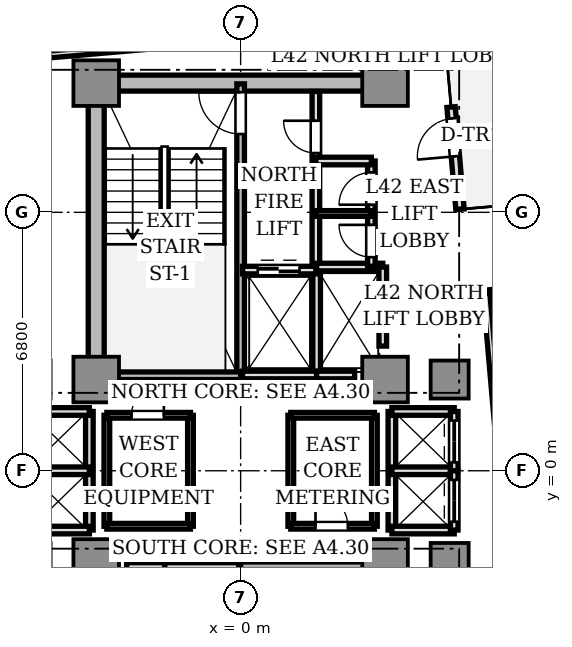
"""IFC4 building model, lengths in metres.
Left out: names, types, materials, properties, quantities, classifications, styles, units other than length and angle.
Written with IfcOpenShell. Run it as: python <this file> out.ifc"""

import sys

from ifc_helpers import new_model, si_unit, direction, frame, frame_2d, origin, origin_2d, place, context, subcontext, project, spatial, rectangle, extrude, source, transform, mapped, element, fill, save


model = new_model("IFC4")
c1 = context("Model", 3, precision=1e-05, world=origin(), true_north=direction((0.0, 1.0)))
c2 = subcontext(c1, "Body", "Model", "MODEL_VIEW")
j1 = project(units=[si_unit("LENGTHUNIT", "METRE"), si_unit("PLANEANGLEUNIT", "RADIAN")], contexts=[c1])
p1 = place(None, origin())
s1 = spatial("IfcSite", under=j1, at=p1, CompositionType="ELEMENT")
p2 = place(p1, origin())
s2 = spatial("IfcBuilding", under=s1, at=p2, CompositionType="ELEMENT")
p3 = place(p2, frame((0.0, 0.0, 153.95)))
s3 = spatial("IfcBuildingStorey", under=s2, at=p3, CompositionType="ELEMENT", Elevation=153.95)
p4 = place(p3, frame((-3.55, 10.2, 0.0), z_axis=(0.0, 0.0, 1.0), x_axis=(1.0, 0.0, 0.0)))
e1 = element("IfcWall", 1, at=p4, inside=s3, PredefinedType="SHEAR", context=c2, shape_type="SweptSolid", body=[
    extrude(rectangle(XDim=7.1, YDim=0.42, at=frame_2d((3.55, 0.0))), origin(), (0.0, 0.0, 1.0), 3.11),
])
p5 = place(p3, frame((-3.8, 2.85, 0.0), z_axis=(0.0, 0.0, 1.0), x_axis=(0.0, 1.0, 0.0)))
e2 = element("IfcWall", 2, at=p5, inside=s3, PredefinedType="SHEAR", context=c2, shape_type="SweptSolid", body=[
    extrude(rectangle(XDim=6.9, YDim=0.42, at=frame_2d((3.45, 0.0))), origin(), (0.0, 0.0, 1.0), 3.11),
])
m1 = source(origin(), c2, "Body", "SweptSolid", [
    extrude(rectangle(XDim=1.2, YDim=1.2, at=origin_2d()), origin(), (0.0, 0.0, 1.0), 3.11),
])
for number, where, z_axis, x_axis in (
    (3, (-3.8, 2.4, 0.0), (0.0, 0.0, 1.0), (1.0, 0.0, 0.0)),
    (4, (3.8, 2.4, 0.0), (0.0, 0.0, 1.0), (1.0, 0.0, 0.0)),
    (5, (-3.8, 10.2, 0.0), (0.0, 0.0, 1.0), (1.0, 0.0, 0.0)),
    (6, (3.8, 10.2, 0.0), (0.0, 0.0, 1.0), (1.0, 0.0, 0.0)),
    (7, (-3.8, -2.4, 0.0), (0.0, 0.0, 1.0), (1.0, 0.0, 0.0)),
    (8, (3.8, -2.4, 0.0), (0.0, 0.0, 1.0), (1.0, 0.0, 0.0)),
):
    element("IfcColumn", number, at=place(p3, frame(where, z_axis=z_axis, x_axis=x_axis)), inside=s3, PredefinedType="COLUMN", context=c2, shape_type="MappedRepresentation", body=[
        mapped(m1, transform((0.0, 0.0, 0.0), scale=1.0)),
    ])
m2 = source(origin(), c2, "Body", "SweptSolid", [
    extrude(rectangle(XDim=1.0, YDim=1.0, at=origin_2d()), origin(), (0.0, 0.0, 1.0), 3.11),
])
for number, where, z_axis, x_axis in (
    (9, (5.5, 2.4, 0.0), (0.0, 0.0, 1.0), (1.0, 0.0, 0.0)),
    (10, (5.5, -2.4, 0.0), (0.0, 0.0, 1.0), (1.0, 0.0, 0.0)),
):
    element("IfcColumn", number, at=place(p3, frame(where, z_axis=z_axis, x_axis=x_axis)), inside=s3, PredefinedType="COLUMN", context=c2, shape_type="MappedRepresentation", body=[
        mapped(m2, transform((0.0, 0.0, 0.0), scale=1.0)),
    ])
p6 = place(p3, frame((5.772, 6.879, 0.0), z_axis=(0.0, 0.0, 1.0), x_axis=(-0.087168071984, 0.996193619346, 0.0)))
e11 = element("IfcWall", 11, at=p6, inside=s3, PredefinedType="STANDARD", context=c2, shape_type="SweptSolid", body=[
    extrude(rectangle(XDim=2.7, YDim=0.22, at=frame_2d((1.35, 0.0))), origin(), (0.0, 0.0, 1.0), 3.11),
])
p7 = place(p6, frame((1.4, 0.0, 0.0)))
e12 = element("IfcOpeningElement", 12, at=p7, cuts=e11, PredefinedType="OPENING", context=c2, shape_type="SweptSolid", body=[
    extrude(rectangle(XDim=1.0, YDim=2.2, at=frame_2d((0.5, 1.1))), frame((0.0, 0.12, 0.0), z_axis=(0.0, -1.0, 0.0), x_axis=(1.0, 0.0, 0.0)), (0.0, 0.0, 1.0), 0.24),
])
p8 = place(p3, frame((0.0, 2.5, 0.0), z_axis=(0.0, 0.0, 1.0), x_axis=(0.0, 1.0, 0.0)))
e13 = element("IfcWall", 13, at=p8, inside=s3, PredefinedType="SOLIDWALL", context=c2, shape_type="SweptSolid", body=[
    extrude(rectangle(XDim=7.68, YDim=0.2, at=frame_2d((3.84, 0.0))), origin(), (0.0, 0.0, 1.0), 3.11),
])
p9 = place(p8, frame((6.36, 0.0, 0.0)))
e14 = element("IfcOpeningElement", 14, at=p9, cuts=e13, PredefinedType="OPENING", context=c2, shape_type="SweptSolid", body=[
    extrude(rectangle(XDim=1.1, YDim=2.15, at=frame_2d((0.55, 1.075))), frame((0.0, 0.11, 0.0), z_axis=(0.0, -1.0, 0.0), x_axis=(1.0, 0.0, 0.0)), (0.0, 0.0, 1.0), 0.22),
])
p10 = place(p3, frame((-3.72, 2.5, 0.0), z_axis=(0.0, 0.0, 1.0), x_axis=(1.0, 0.0, 0.0)))
e15 = element("IfcWall", 15, at=p10, inside=s3, PredefinedType="SOLIDWALL", context=c2, shape_type="SweptSolid", body=[
    extrude(rectangle(XDim=3.72, YDim=0.2, at=frame_2d((1.86, 0.0))), origin(), (0.0, 0.0, 1.0), 3.11),
])
p11 = place(p3, frame((0.0, -10.18, 0.0), z_axis=(0.0, 0.0, 1.0), x_axis=(0.0, 1.0, 0.0)))
e16 = element("IfcWall", 16, at=p11, inside=s3, PredefinedType="SOLIDWALL", context=c2, shape_type="SweptSolid", body=[
    extrude(rectangle(XDim=7.68, YDim=0.2, at=frame_2d((3.84, 0.0))), origin(), (0.0, 0.0, 1.0), 3.11),
])
p12 = place(p11, frame((0.28, 0.0, 0.0)))
e17 = element("IfcOpeningElement", 17, at=p12, cuts=e16, PredefinedType="OPENING", context=c2, shape_type="SweptSolid", body=[
    extrude(rectangle(XDim=1.1, YDim=2.15, at=frame_2d((0.55, 1.075))), frame((0.0, 0.11, 0.0), z_axis=(0.0, -1.0, 0.0), x_axis=(1.0, 0.0, 0.0)), (0.0, 0.0, 1.0), 0.22),
])
p13 = place(p3, frame((0.0, -2.5, 0.0), z_axis=(0.0, 0.0, 1.0), x_axis=(1.0, 0.0, 0.0)))
e18 = element("IfcWall", 18, at=p13, inside=s3, PredefinedType="SOLIDWALL", context=c2, shape_type="SweptSolid", body=[
    extrude(rectangle(XDim=3.72, YDim=0.2, at=frame_2d((1.86, 0.0))), origin(), (0.0, 0.0, 1.0), 3.11),
])
p14 = place(p3, frame((1.98, 5.32, 0.0), z_axis=(0.0, 0.0, 1.0), x_axis=(0.0, 1.0, 0.0)))
e19 = element("IfcWall", 19, at=p14, inside=s3, PredefinedType="SOLIDWALL", context=c2, shape_type="SweptSolid", body=[
    extrude(rectangle(XDim=4.66, YDim=0.2, at=frame_2d((2.33, 0.0))), origin(), (0.0, 0.0, 1.0), 2.66),
])
p15 = place(p14, frame((3.04, 0.0, 0.0)))
e20 = element("IfcOpeningElement", 20, at=p15, cuts=e19, PredefinedType="OPENING", context=c2, shape_type="SweptSolid", body=[
    extrude(rectangle(XDim=0.85, YDim=2.1, at=frame_2d((0.425, 1.05))), frame((0.0, 0.11, 0.0), z_axis=(0.0, -1.0, 0.0), x_axis=(1.0, 0.0, 0.0)), (0.0, 0.0, 1.0), 0.22),
])
p16 = place(p3, frame((2.0, 2.5, 0.0), z_axis=(0.0, 0.0, 1.0), x_axis=(0.0, 1.0, 0.0)))
e21 = element("IfcWall", 21, at=p16, inside=s3, PredefinedType="SOLIDWALL", context=c2, shape_type="SweptSolid", body=[
    extrude(rectangle(XDim=2.78, YDim=0.2, at=frame_2d((1.39, 0.0))), origin(), (0.0, 0.0, 1.0), 2.66),
])
p17 = place(p3, frame((0.05, 2.52, 0.0), z_axis=(0.0, 0.0, 1.0), x_axis=(1.0, 0.0, 0.0)))
e22 = element("IfcWall", 22, at=p17, inside=s3, PredefinedType="SOLIDWALL", context=c2, shape_type="SweptSolid", body=[
    extrude(rectangle(XDim=1.95, YDim=0.2, at=frame_2d((0.975, 0.0))), origin(), (0.0, 0.0, 1.0), 2.66),
])
p18 = place(p3, frame((0.05, 5.28, 0.0), z_axis=(0.0, 0.0, 1.0), x_axis=(1.0, 0.0, 0.0)))
e23 = element("IfcWall", 23, at=p18, inside=s3, PredefinedType="SOLIDWALL", context=c2, shape_type="SweptSolid", body=[
    extrude(rectangle(XDim=1.93, YDim=0.2, at=frame_2d((0.965, 0.0))), origin(), (0.0, 0.0, 1.0), 2.66),
])
p19 = place(p18, frame((0.4, 0.0, 0.0)))
e24 = element("IfcOpeningElement", 24, at=p19, cuts=e23, PredefinedType="OPENING", context=c2, shape_type="SweptSolid", body=[
    extrude(rectangle(XDim=1.1, YDim=2.2, at=frame_2d((0.55, 1.1))), frame((0.0, 0.11, 0.0), z_axis=(0.0, -1.0, 0.0), x_axis=(1.0, 0.0, 0.0)), (0.0, 0.0, 1.0), 0.22),
])
p20 = place(p3, frame((-2.0, -5.28, 0.0), z_axis=(0.0, 0.0, 1.0), x_axis=(0.0, 1.0, 0.0)))
e25 = element("IfcWall", 25, at=p20, inside=s3, PredefinedType="SOLIDWALL", context=c2, shape_type="SweptSolid", body=[
    extrude(rectangle(XDim=2.78, YDim=0.2, at=frame_2d((1.39, 0.0))), origin(), (0.0, 0.0, 1.0), 2.66),
])
p21 = place(p3, frame((-2.0, -2.52, 0.0), z_axis=(0.0, 0.0, 1.0), x_axis=(1.0, 0.0, 0.0)))
e26 = element("IfcWall", 26, at=p21, inside=s3, PredefinedType="SOLIDWALL", context=c2, shape_type="SweptSolid", body=[
    extrude(rectangle(XDim=1.95, YDim=0.2, at=frame_2d((0.975, 0.0))), origin(), (0.0, 0.0, 1.0), 2.66),
])
p22 = place(p3, frame((2.0, 2.52, 0.0), z_axis=(0.0, 0.0, 1.0), x_axis=(1.0, 0.0, 0.0)))
e27 = element("IfcWall", 27, at=p22, inside=s3, PredefinedType="SOLIDWALL", context=c2, shape_type="SweptSolid", body=[
    extrude(rectangle(XDim=1.0, YDim=0.2, at=frame_2d((0.5, 0.0))), origin(), (0.0, 0.0, 1.0), 2.66),
])
p23 = place(p3, frame((2.0, 5.36, 0.0), z_axis=(0.0, 0.0, 1.0), x_axis=(1.0, 0.0, 0.0)))
e28 = element("IfcWall", 28, at=p23, inside=s3, PredefinedType="SOLIDWALL", context=c2, shape_type="SweptSolid", body=[
    extrude(rectangle(XDim=1.74, YDim=0.2, at=frame_2d((0.87, 0.0))), origin(), (0.0, 0.0, 1.0), 2.66),
])
p24 = place(p3, frame((3.74, 3.28, 0.0), z_axis=(0.0, 0.0, 1.0), x_axis=(0.0, 1.0, 0.0)))
e29 = element("IfcWall", 29, at=p24, inside=s3, PredefinedType="SOLIDWALL", context=c2, shape_type="SweptSolid", body=[
    extrude(rectangle(XDim=2.08, YDim=0.2, at=frame_2d((1.04, 0.0))), origin(), (0.0, 0.0, 1.0), 2.66),
])
p25 = place(p24, frame((0.44, 0.0, 0.0)))
e30 = element("IfcOpeningElement", 30, at=p25, cuts=e29, PredefinedType="OPENING", context=c2, shape_type="SweptSolid", body=[
    extrude(rectangle(XDim=1.2, YDim=2.2, at=frame_2d((0.6, 1.1))), frame((0.0, 0.11, 0.0), z_axis=(0.0, -1.0, 0.0), x_axis=(1.0, 0.0, 0.0)), (0.0, 0.0, 1.0), 0.22),
])
p26 = place(p3, frame((-3.0, -2.52, 0.0), z_axis=(0.0, 0.0, 1.0), x_axis=(1.0, 0.0, 0.0)))
e31 = element("IfcWall", 31, at=p26, inside=s3, PredefinedType="SOLIDWALL", context=c2, shape_type="SweptSolid", body=[
    extrude(rectangle(XDim=1.0, YDim=0.2, at=frame_2d((0.5, 0.0))), origin(), (0.0, 0.0, 1.0), 2.66),
])
p27 = place(p3, frame((3.98, -1.56, 0.0), z_axis=(0.0, 0.0, 1.0), x_axis=(0.0, 1.0, 0.0)))
e32 = element("IfcWall", 32, at=p27, inside=s3, PredefinedType="SOLIDWALL", context=c2, shape_type="SweptSolid", body=[
    extrude(rectangle(XDim=3.12, YDim=0.2, at=frame_2d((1.56, 0.0))), origin(), (0.0, 0.0, 1.0), 2.28),
])
for number, where, z_axis, x_axis in (
    (33, (3.98, 1.56, 0.0), (0.0, 0.0, 1.0), (1.0, 0.0, 0.0)),
    (34, (3.98, -1.56, 0.0), (0.0, 0.0, 1.0), (1.0, 0.0, 0.0)),
    (35, (3.98, 0.0, 0.0), (0.0, 0.0, 1.0), (1.0, 0.0, 0.0)),
):
    element("IfcWall", number, at=place(p3, frame(where, z_axis=z_axis, x_axis=x_axis)), inside=s3, PredefinedType="SOLIDWALL", context=c2, shape_type="SweptSolid", body=[
        extrude(rectangle(XDim=1.64, YDim=0.2, at=frame_2d((0.82, 0.0))), origin(), (0.0, 0.0, 1.0), 2.66),
    ])
p28 = place(p3, frame((5.62, 0.0, 0.0), z_axis=(0.0, 0.0, 1.0), x_axis=(0.0, 1.0, 0.0)))
e36 = element("IfcWall", 36, at=p28, inside=s3, PredefinedType="SOLIDWALL", context=c2, shape_type="SweptSolid", body=[
    extrude(rectangle(XDim=1.56, YDim=0.2, at=frame_2d((0.78, 0.0))), origin(), (0.0, 0.0, 1.0), 2.66),
])
p29 = place(p28, frame((0.22, 0.0, 0.0)))
e37 = element("IfcOpeningElement", 37, at=p29, cuts=e36, PredefinedType="OPENING", context=c2, shape_type="SweptSolid", body=[
    extrude(rectangle(XDim=1.1, YDim=2.2, at=frame_2d((0.55, 1.1))), frame((0.0, 0.11, 0.0), z_axis=(0.0, -1.0, 0.0), x_axis=(1.0, 0.0, 0.0)), (0.0, 0.0, 1.0), 0.22),
])
p30 = place(p3, frame((5.62, -1.56, 0.0), z_axis=(0.0, 0.0, 1.0), x_axis=(0.0, 1.0, 0.0)))
e38 = element("IfcWall", 38, at=p30, inside=s3, PredefinedType="SOLIDWALL", context=c2, shape_type="SweptSolid", body=[
    extrude(rectangle(XDim=1.56, YDim=0.2, at=frame_2d((0.78, 0.0))), origin(), (0.0, 0.0, 1.0), 2.66),
])
p31 = place(p30, frame((0.22, 0.0, 0.0)))
e39 = element("IfcOpeningElement", 39, at=p31, cuts=e38, PredefinedType="OPENING", context=c2, shape_type="SweptSolid", body=[
    extrude(rectangle(XDim=1.1, YDim=2.2, at=frame_2d((0.55, 1.1))), frame((0.0, 0.11, 0.0), z_axis=(0.0, -1.0, 0.0), x_axis=(1.0, 0.0, 0.0)), (0.0, 0.0, 1.0), 0.22),
])
p32 = place(p3, frame((-3.98, -1.56, 0.0), z_axis=(0.0, 0.0, 1.0), x_axis=(0.0, 1.0, 0.0)))
e40 = element("IfcWall", 40, at=p32, inside=s3, PredefinedType="SOLIDWALL", context=c2, shape_type="SweptSolid", body=[
    extrude(rectangle(XDim=3.12, YDim=0.2, at=frame_2d((1.56, 0.0))), origin(), (0.0, 0.0, 1.0), 2.28),
])
for number, where, z_axis, x_axis in (
    (41, (-5.62, 1.56, 0.0), (0.0, 0.0, 1.0), (1.0, 0.0, 0.0)),
    (42, (-5.62, -1.56, 0.0), (0.0, 0.0, 1.0), (1.0, 0.0, 0.0)),
    (43, (-5.62, 0.0, 0.0), (0.0, 0.0, 1.0), (1.0, 0.0, 0.0)),
):
    element("IfcWall", number, at=place(p3, frame(where, z_axis=z_axis, x_axis=x_axis)), inside=s3, PredefinedType="SOLIDWALL", context=c2, shape_type="SweptSolid", body=[
        extrude(rectangle(XDim=1.64, YDim=0.2, at=frame_2d((0.82, 0.0))), origin(), (0.0, 0.0, 1.0), 2.66),
    ])
p33 = place(p3, frame((3.44, 5.38, 0.0), z_axis=(0.0, 0.0, 1.0), x_axis=(0.0, 1.0, 0.0)))
e44 = element("IfcWall", 44, at=p33, inside=s3, PredefinedType="SOLIDWALL", context=c2, shape_type="SweptSolid", body=[
    extrude(rectangle(XDim=2.77, YDim=0.2, at=frame_2d((1.385, 0.0))), origin(), (0.0, 0.0, 1.0), 2.66),
])
p34 = place(p33, frame((0.24, 0.0, 0.0)))
e45 = element("IfcOpeningElement", 45, at=p34, cuts=e44, PredefinedType="OPENING", context=c2, shape_type="SweptSolid", body=[
    extrude(rectangle(XDim=0.85, YDim=2.1, at=frame_2d((0.425, 1.05))), frame((0.0, 0.11, 0.0), z_axis=(0.0, -1.0, 0.0), x_axis=(1.0, 0.0, 0.0)), (0.0, 0.0, 1.0), 0.22),
])
p35 = place(p33, frame((1.62, 0.0, 0.0)))
e46 = element("IfcOpeningElement", 46, at=p35, cuts=e44, PredefinedType="OPENING", context=c2, shape_type="SweptSolid", body=[
    extrude(rectangle(XDim=0.85, YDim=2.1, at=frame_2d((0.425, 1.05))), frame((0.0, 0.11, 0.0), z_axis=(0.0, -1.0, 0.0), x_axis=(1.0, 0.0, 0.0)), (0.0, 0.0, 1.0), 0.22),
])
p36 = place(p3, frame((1.98, 8.15, 0.0), z_axis=(0.0, 0.0, 1.0), x_axis=(1.0, 0.0, 0.0)))
e47 = element("IfcWall", 47, at=p36, inside=s3, PredefinedType="SOLIDWALL", context=c2, shape_type="SweptSolid", body=[
    extrude(rectangle(XDim=1.46, YDim=0.2, at=frame_2d((0.73, 0.0))), origin(), (0.0, 0.0, 1.0), 2.66),
])
p37 = place(p3, frame((1.98, 6.77, 0.0), z_axis=(0.0, 0.0, 1.0), x_axis=(1.0, 0.0, 0.0)))
e48 = element("IfcWall", 48, at=p37, inside=s3, PredefinedType="PARTITIONING", context=c2, shape_type="SweptSolid", body=[
    extrude(rectangle(XDim=1.46, YDim=0.15, at=frame_2d((0.73, 0.0))), origin(), (0.0, 0.0, 1.0), 2.66),
])
p38 = place(p3, frame((-1.32, -1.46, 0.0), z_axis=(0.0, 0.0, 1.0), x_axis=(0.0, 1.0, 0.0)))
e49 = element("IfcWall", 49, at=p38, inside=s3, PredefinedType="PARTITIONING", context=c2, shape_type="SweptSolid", body=[
    extrude(rectangle(XDim=2.92, YDim=0.15, at=frame_2d((1.46, 0.0))), origin(), (0.0, 0.0, 1.0), 2.66),
])
p39 = place(p3, frame((-3.52, -1.46, 0.0), z_axis=(0.0, 0.0, 1.0), x_axis=(0.0, 1.0, 0.0)))
e50 = element("IfcWall", 50, at=p39, inside=s3, PredefinedType="PARTITIONING", context=c2, shape_type="SweptSolid", body=[
    extrude(rectangle(XDim=2.92, YDim=0.15, at=frame_2d((1.46, 0.0))), origin(), (0.0, 0.0, 1.0), 2.28),
])
p40 = place(p3, frame((-3.52, 1.46, 0.0), z_axis=(0.0, 0.0, 1.0), x_axis=(1.0, 0.0, 0.0)))
e51 = element("IfcWall", 51, at=p40, inside=s3, PredefinedType="PARTITIONING", context=c2, shape_type="SweptSolid", body=[
    extrude(rectangle(XDim=2.2, YDim=0.15, at=frame_2d((1.1, 0.0))), origin(), (0.0, 0.0, 1.0), 2.66),
])
p41 = place(p40, frame((0.65, 0.0, 0.0)))
e52 = element("IfcOpeningElement", 52, at=p41, cuts=e51, PredefinedType="OPENING", context=c2, shape_type="SweptSolid", body=[
    extrude(rectangle(XDim=0.85, YDim=2.1, at=frame_2d((0.425, 1.05))), frame((0.0, 0.085, 0.0), z_axis=(0.0, -1.0, 0.0), x_axis=(1.0, 0.0, 0.0)), (0.0, 0.0, 1.0), 0.17),
])
p42 = place(p3, frame((-3.52, -1.46, 0.0), z_axis=(0.0, 0.0, 1.0), x_axis=(1.0, 0.0, 0.0)))
e53 = element("IfcWall", 53, at=p42, inside=s3, PredefinedType="PARTITIONING", context=c2, shape_type="SweptSolid", body=[
    extrude(rectangle(XDim=2.2, YDim=0.15, at=frame_2d((1.1, 0.0))), origin(), (0.0, 0.0, 1.0), 2.66),
])
p43 = place(p3, frame((1.32, -1.46, 0.0), z_axis=(0.0, 0.0, 1.0), x_axis=(0.0, 1.0, 0.0)))
e54 = element("IfcWall", 54, at=p43, inside=s3, PredefinedType="PARTITIONING", context=c2, shape_type="SweptSolid", body=[
    extrude(rectangle(XDim=2.92, YDim=0.15, at=frame_2d((1.46, 0.0))), origin(), (0.0, 0.0, 1.0), 2.66),
])
p44 = place(p3, frame((3.52, -1.46, 0.0), z_axis=(0.0, 0.0, 1.0), x_axis=(0.0, 1.0, 0.0)))
e55 = element("IfcWall", 55, at=p44, inside=s3, PredefinedType="PARTITIONING", context=c2, shape_type="SweptSolid", body=[
    extrude(rectangle(XDim=2.92, YDim=0.15, at=frame_2d((1.46, 0.0))), origin(), (0.0, 0.0, 1.0), 2.28),
])
p45 = place(p3, frame((1.32, 1.46, 0.0), z_axis=(0.0, 0.0, 1.0), x_axis=(1.0, 0.0, 0.0)))
e56 = element("IfcWall", 56, at=p45, inside=s3, PredefinedType="PARTITIONING", context=c2, shape_type="SweptSolid", body=[
    extrude(rectangle(XDim=2.2, YDim=0.15, at=frame_2d((1.1, 0.0))), origin(), (0.0, 0.0, 1.0), 2.66),
])
p46 = place(p3, frame((1.32, -1.46, 0.0), z_axis=(0.0, 0.0, 1.0), x_axis=(1.0, 0.0, 0.0)))
e57 = element("IfcWall", 57, at=p46, inside=s3, PredefinedType="PARTITIONING", context=c2, shape_type="SweptSolid", body=[
    extrude(rectangle(XDim=2.2, YDim=0.15, at=frame_2d((1.1, 0.0))), origin(), (0.0, 0.0, 1.0), 2.66),
])
p47 = place(p46, frame((0.65, 0.0, 0.0)))
e58 = element("IfcOpeningElement", 58, at=p47, cuts=e57, PredefinedType="OPENING", context=c2, shape_type="SweptSolid", body=[
    extrude(rectangle(XDim=0.85, YDim=2.1, at=frame_2d((0.425, 1.05))), frame((0.0, 0.085, 0.0), z_axis=(0.0, -1.0, 0.0), x_axis=(1.0, 0.0, 0.0)), (0.0, 0.0, 1.0), 0.17),
])
p48 = place(p3, frame((6.467, 4.681, 0.0), z_axis=(0.0, 0.0, 1.0), x_axis=(0.996195452949, 0.087147114263, 0.0)))
e59 = element("IfcWall", 59, at=p48, inside=s3, PredefinedType="PARTITIONING", context=c2, shape_type="SweptSolid", body=[
    extrude(rectangle(XDim=8.55, YDim=0.15, at=frame_2d((4.275, 0.0))), origin(), (0.0, 0.0, 1.0), 2.66),
])
p49 = place(p48, frame((1.491, 0.0, 0.0)))
e60 = element("IfcOpeningElement", 60, at=p49, cuts=e59, PredefinedType="OPENING", context=c2, shape_type="SweptSolid", body=[
    extrude(rectangle(XDim=0.85, YDim=2.1, at=frame_2d((0.425, 1.05))), frame((0.0, 0.085, 0.0), z_axis=(0.0, -1.0, 0.0), x_axis=(1.0, 0.0, 0.0)), (0.0, 0.0, 1.0), 0.17),
])
p50 = place(p48, frame((4.792, 0.0, 0.0)))
e61 = element("IfcOpeningElement", 61, at=p50, cuts=e59, PredefinedType="OPENING", context=c2, shape_type="SweptSolid", body=[
    extrude(rectangle(XDim=0.85, YDim=2.1, at=frame_2d((0.425, 1.05))), frame((0.0, 0.085, 0.0), z_axis=(0.0, -1.0, 0.0), x_axis=(1.0, 0.0, 0.0)), (0.0, 0.0, 1.0), 0.17),
])
p51 = place(p3, frame((7.373, -5.679, 0.0), z_axis=(0.0, 0.0, 1.0), x_axis=(-0.087163455754, 0.996194023261, 0.0)))
e62 = element("IfcWall", 62, at=p51, inside=s3, PredefinedType="PARTITIONING", context=c2, shape_type="SweptSolid", body=[
    extrude(rectangle(XDim=10.4, YDim=0.18, at=frame_2d((5.2, 0.0))), origin(), (0.0, 0.0, 1.0), 2.66),
])
p52 = place(p3, frame((-1.936, 11.224, 0.0), z_axis=(0.0, 0.0, 1.0), x_axis=(-0.996194212812, -0.087161289348, 0.0)))
e63 = element("IfcWall", 63, at=p52, inside=s3, PredefinedType="PARTITIONING", context=c2, shape_type="SweptSolid", body=[
    extrude(rectangle(XDim=5.35, YDim=0.18, at=frame_2d((2.675, 0.0))), origin(), (0.0, 0.0, 1.0), 2.66),
])
m3 = source(origin(), c2, "Body", "SweptSolid", [
    extrude(rectangle(XDim=1.0, YDim=0.05, at=origin_2d()), origin(), (0.0, 0.0, 1.0), 2.2),
])
p53 = place(p7, frame((0.5, 0.0, 0.0)))
e64 = element("IfcDoor", 64, at=p53, inside=s3, OperationType="SINGLE_SWING_LEFT", PredefinedType="DOOR", context=c2, shape_type="MappedRepresentation", body=[
    mapped(m3, transform((0.0, 0.0, 0.0), scale=1.0)),
])
fill(e12, e64)
m4 = source(origin(), c2, "Body", "SweptSolid", [
    extrude(rectangle(XDim=1.1, YDim=0.05, at=origin_2d()), origin(), (0.0, 0.0, 1.0), 2.15),
])
p54 = place(p9, frame((0.55, 0.0, 0.0)))
e65 = element("IfcDoor", 65, at=p54, inside=s3, OperationType="SINGLE_SWING_RIGHT", PredefinedType="DOOR", context=c2, shape_type="MappedRepresentation", body=[
    mapped(m4, transform((0.0, 0.0, 0.0), scale=1.0)),
])
fill(e14, e65)
m5 = source(origin(), c2, "Body", "SweptSolid", [
    extrude(rectangle(XDim=0.85, YDim=0.05, at=origin_2d()), origin(), (0.0, 0.0, 1.0), 2.1),
])
p55 = place(p15, frame((0.425, 0.0, 0.0)))
e66 = element("IfcDoor", 66, at=p55, inside=s3, OperationType="SINGLE_SWING_RIGHT", PredefinedType="DOOR", context=c2, shape_type="MappedRepresentation", body=[
    mapped(m5, transform((0.0, 0.0, 0.0), scale=1.0)),
])
fill(e20, e66)
m6 = source(origin(), c2, "Body", "SweptSolid", [
    extrude(rectangle(XDim=1.1, YDim=0.05, at=origin_2d()), origin(), (0.0, 0.0, 1.0), 2.2),
])
p56 = place(p19, frame((0.55, 0.0, 0.0)))
e67 = element("IfcDoor", 67, at=p56, inside=s3, OperationType="DOUBLE_DOOR_SLIDING", PredefinedType="DOOR", context=c2, shape_type="MappedRepresentation", body=[
    mapped(m6, transform((0.0, 0.0, 0.0), scale=1.0)),
])
fill(e24, e67)
m7 = source(origin(), c2, "Body", "SweptSolid", [
    extrude(rectangle(XDim=1.2, YDim=0.05, at=origin_2d()), origin(), (0.0, 0.0, 1.0), 2.2),
])
p57 = place(p25, frame((0.6, 0.0, 0.0)))
e68 = element("IfcDoor", 68, at=p57, inside=s3, OperationType="DOUBLE_DOOR_SLIDING", PredefinedType="DOOR", context=c2, shape_type="MappedRepresentation", body=[
    mapped(m7, transform((0.0, 0.0, 0.0), scale=1.0)),
])
fill(e30, e68)
p58 = place(p29, frame((0.55, 0.0, 0.0)))
e69 = element("IfcDoor", 69, at=p58, inside=s3, OperationType="DOUBLE_DOOR_SLIDING", PredefinedType="DOOR", context=c2, shape_type="MappedRepresentation", body=[
    mapped(m6, transform((0.0, 0.0, 0.0), scale=1.0)),
])
fill(e37, e69)
p59 = place(p31, frame((0.55, 0.0, 0.0)))
e70 = element("IfcDoor", 70, at=p59, inside=s3, OperationType="DOUBLE_DOOR_SLIDING", PredefinedType="DOOR", context=c2, shape_type="MappedRepresentation", body=[
    mapped(m6, transform((0.0, 0.0, 0.0), scale=1.0)),
])
fill(e39, e70)
p60 = place(p34, frame((0.425, 0.0, 0.0)))
e71 = element("IfcDoor", 71, at=p60, inside=s3, OperationType="SINGLE_SWING_RIGHT", PredefinedType="DOOR", context=c2, shape_type="MappedRepresentation", body=[
    mapped(m5, transform((0.0, 0.0, 0.0), scale=1.0)),
])
fill(e45, e71)
p61 = place(p35, frame((0.425, 0.0, 0.0)))
e72 = element("IfcDoor", 72, at=p61, inside=s3, OperationType="SINGLE_SWING_LEFT", PredefinedType="DOOR", context=c2, shape_type="MappedRepresentation", body=[
    mapped(m5, transform((0.0, 0.0, 0.0), scale=1.0)),
])
fill(e46, e72)
p62 = place(p41, frame((0.425, 0.0, 0.0)))
e73 = element("IfcDoor", 73, at=p62, inside=s3, OperationType="SINGLE_SWING_RIGHT", PredefinedType="DOOR", context=c2, shape_type="MappedRepresentation", body=[
    mapped(m5, transform((0.0, 0.0, 0.0), scale=1.0)),
])
fill(e52, e73)
p63 = place(p47, frame((0.425, 0.0, 0.0)))
e74 = element("IfcDoor", 74, at=p63, inside=s3, OperationType="SINGLE_SWING_LEFT", PredefinedType="DOOR", context=c2, shape_type="MappedRepresentation", body=[
    mapped(m5, transform((0.0, 0.0, 0.0), scale=1.0)),
])
fill(e58, e74)
save(model, sys.argv[1])
